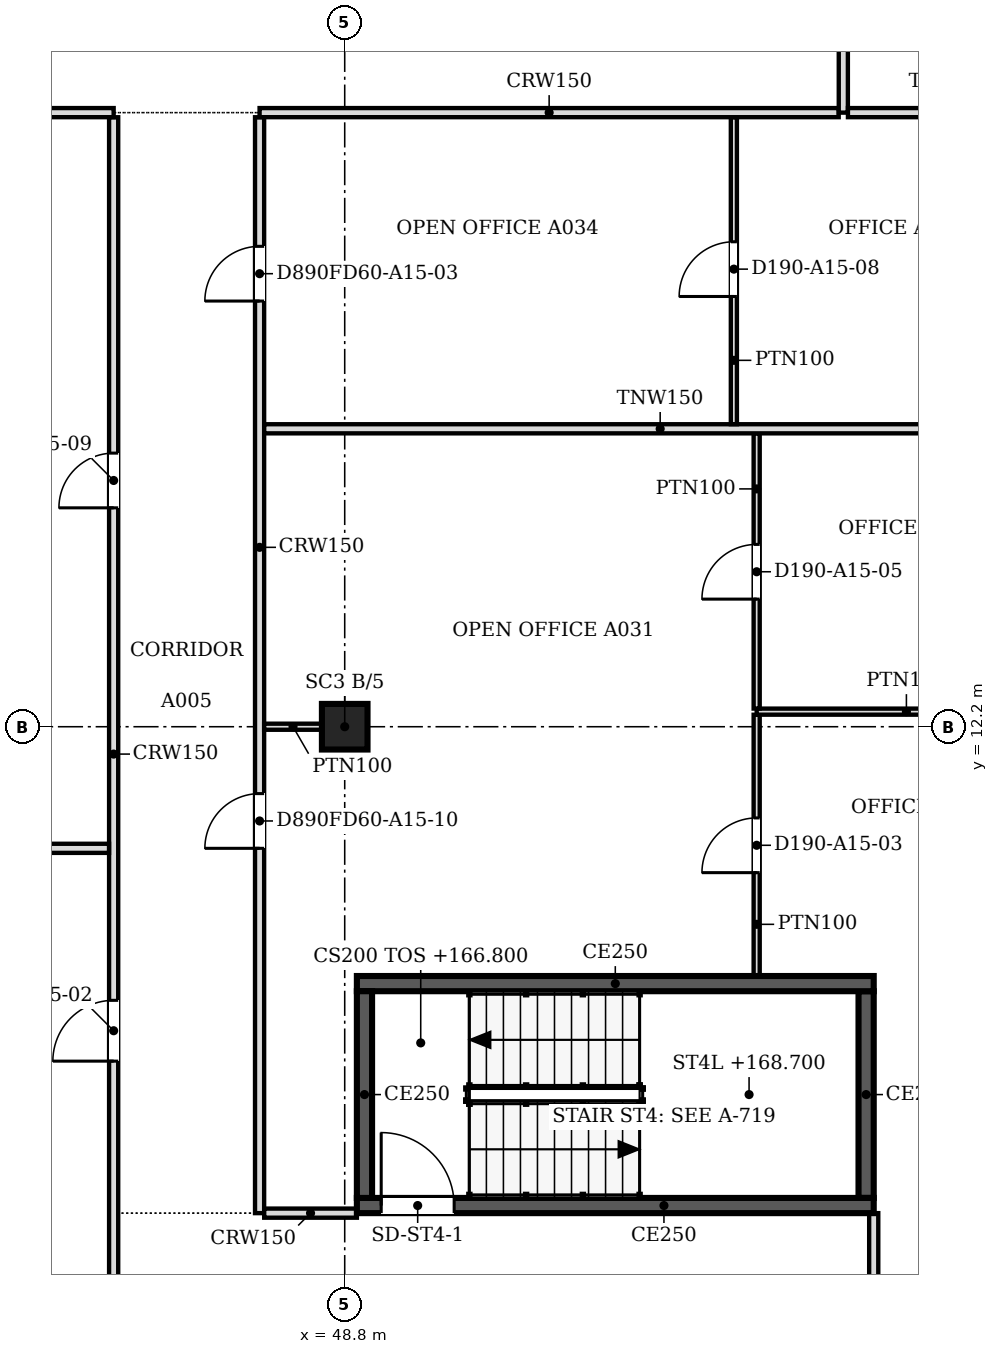
"""IFC4 building model, lengths in metres.
Left out: names, types, materials, properties, quantities, classifications, styles, units other than length and angle.
Written with IfcOpenShell. Run it as: python <this file> out.ifc"""

import sys

from ifc_helpers import new_model, si_unit, direction, frame, frame_2d, origin, origin_2d, place, context, subcontext, project, spatial, polyline, rectangle, outline, extrude, faceted_brep, source, transform, mapped, element, fill, save


model = new_model("IFC4")
c1 = context("Model", 3, precision=1e-05, world=origin(), true_north=direction((0.0, 1.0)))
c2 = subcontext(c1, "Body", "Model", "MODEL_VIEW")
j1 = project(units=[si_unit("LENGTHUNIT", "METRE"), si_unit("PLANEANGLEUNIT", "RADIAN")], contexts=[c1])
p1 = place(None, origin())
s1 = spatial("IfcSite", under=j1, at=p1, CompositionType="ELEMENT")
p2 = place(p1, origin())
s2 = spatial("IfcBuilding", under=s1, at=p2, CompositionType="ELEMENT")
p3 = place(p2, frame((0.0, 0.0, 166.8)))
s3 = spatial("IfcBuildingStorey", under=s2, at=p3, CompositionType="ELEMENT", Elevation=166.8)
p4 = place(p3, frame((48.8, 12.2, 0.0), z_axis=(0.0, 0.0, 1.0), x_axis=(1.0, 0.0, 0.0)))
e1 = element("IfcColumn", 1, at=p4, inside=s3, PredefinedType="COLUMN", context=c2, shape_type="SweptSolid", body=[
    extrude(rectangle(XDim=0.75, YDim=0.75, at=origin_2d()), origin(), (0.0, 0.0, 1.0), 3.6),
])
m1 = source(origin(), c2, "Body", "Brep", [
    faceted_brep([(0.053, -0.25, 0.0), (2.997, -0.25, 3.8), (0.053, -0.25, 7.6), (0.0, -0.25, 7.532), (0.0, -0.25, 0.068), (0.106, 0.25, 7.532), (2.944, 0.25, 3.868), (2.944, 0.25, 3.732), (0.106, 0.25, 0.068), (2.997, 0.0, 3.8), (0.053, 0.0, 0.0), (0.053, 0.0, 7.6)], [[[0, 1, 2, 3, 4]], [[5, 6, 7, 8]], [[8, 7, 9, 1, 0, 10]], [[6, 5, 11, 2, 1, 9]], [[3, 2, 11]], [[10, 0, 4]], [[8, 10, 4, 3, 11, 5]], [[9, 7, 6]]]),
])
p5 = place(p3, frame((57.569, 1.274, -3.8), z_axis=(0.0, 0.0, 1.0), x_axis=(0.707066050402, 0.707147509625, 0.0)))
e2 = element("IfcWall", 2, at=p5, inside=s3, PredefinedType="SOLIDWALL", context=c2, shape_type="MappedRepresentation", body=[
    mapped(m1, transform((0.0, 0.0, 0.0), scale=1.0)),
])
m2 = source(origin(), c2, "Body", "SweptSolid", [
    extrude(outline(polyline([(0.253, 0.666), (2.681, 3.8), (0.253, 6.934), (0.253, 0.666)])), frame((0.0, 0.26, 0.0), z_axis=(0.0, -1.0, 0.0), x_axis=(1.0, 0.0, 0.0)), (0.0, 0.0, 1.0), 0.52),
])
p6 = place(p5, origin())
e3 = element("IfcOpeningElement", 3, at=p6, cuts=e2, PredefinedType="OPENING", context=c2, shape_type="MappedRepresentation", body=[
    mapped(m2, transform((0.0, 0.0, 0.0), scale=1.0)),
])
p7 = place(p2, frame((0.0, 0.0, 170.6)))
s4 = spatial("IfcBuildingStorey", under=s2, at=p7, CompositionType="ELEMENT", Elevation=170.6)
m3 = source(origin(), c2, "Body", "Brep", [
    faceted_brep([(2.944, -0.25, 0.0), (2.997, -0.25, 0.068), (2.997, -0.25, 7.532), (2.944, -0.25, 7.6), (0.0, -0.25, 3.8), (0.053, 0.25, 3.868), (2.891, 0.25, 7.532), (2.891, 0.25, 0.068), (0.053, 0.25, 3.732), (2.944, 0.0, 0.0), (2.944, 0.0, 7.6), (0.0, 0.0, 3.8)], [[[0, 1, 2, 3, 4]], [[5, 6, 7, 8]], [[1, 0, 9]], [[10, 3, 2]], [[6, 5, 11, 4, 3, 10]], [[8, 7, 9, 0, 4, 11]], [[8, 11, 5]], [[1, 9, 7, 6, 10, 2]]]),
])
p8 = place(p7, frame((57.606, 1.312, -3.8), z_axis=(0.0, 0.0, 1.0), x_axis=(0.707147509625, 0.707066050402, 0.0)))
e4 = element("IfcWall", 4, at=p8, inside=s4, PredefinedType="SOLIDWALL", context=c2, shape_type="MappedRepresentation", body=[
    mapped(m3, transform((0.0, 0.0, 0.0), scale=1.0)),
])
m4 = source(origin(), c2, "Body", "SweptSolid", [
    extrude(outline(polyline([(2.744, 6.934), (0.316, 3.8), (2.744, 0.666), (2.744, 6.934)])), frame((0.0, 0.26, 0.0), z_axis=(0.0, -1.0, 0.0), x_axis=(1.0, 0.0, 0.0)), (0.0, 0.0, 1.0), 0.52),
])
p9 = place(p8, origin())
e5 = element("IfcOpeningElement", 5, at=p9, cuts=e4, PredefinedType="OPENING", context=c2, shape_type="MappedRepresentation", body=[
    mapped(m4, transform((0.0, 0.0, 0.0), scale=1.0)),
])
p10 = place(p3, frame((57.5, 4.325, 0.0), z_axis=(0.0, 0.0, 1.0), x_axis=(-1.0, 0.0, 0.0)))
e6 = element("IfcWall", 6, at=p10, inside=s3, PredefinedType="SOLIDWALL", context=c2, shape_type="SweptSolid", body=[
    extrude(rectangle(XDim=8.5, YDim=0.25, at=frame_2d((4.25, 0.0))), origin(), (0.0, 0.0, 1.0), 3.8),
])
m5 = source(origin(), c2, "Body", "SweptSolid", [
    extrude(rectangle(XDim=1.2, YDim=2.1, at=frame_2d((0.6, 1.05))), frame((0.0, 0.135, 0.0), z_axis=(0.0, -1.0, 0.0), x_axis=(1.0, 0.0, 0.0)), (0.0, 0.0, 1.0), 0.27),
])
p11 = place(p10, frame((6.9, 0.0, 0.0)))
e7 = element("IfcOpeningElement", 7, at=p11, cuts=e6, PredefinedType="OPENING", context=c2, shape_type="MappedRepresentation", body=[
    mapped(m5, transform((0.0, 0.0, 0.0), scale=1.0)),
])
p12 = place(p3, frame((49.125, 4.45, 0.0), z_axis=(0.0, 0.0, 1.0), x_axis=(0.0, 1.0, 0.0)))
e8 = element("IfcWall", 8, at=p12, inside=s3, PredefinedType="SOLIDWALL", context=c2, shape_type="SweptSolid", body=[
    extrude(rectangle(XDim=3.4, YDim=0.25, at=frame_2d((1.7, 0.0))), origin(), (0.0, 0.0, 1.0), 3.8),
])
p13 = place(p3, frame((49.0, 7.975, 0.0), z_axis=(0.0, 0.0, 1.0), x_axis=(1.0, 0.0, 0.0)))
e9 = element("IfcWall", 9, at=p13, inside=s3, PredefinedType="SOLIDWALL", context=c2, shape_type="SweptSolid", body=[
    extrude(rectangle(XDim=8.5, YDim=0.25, at=frame_2d((4.25, 0.0))), origin(), (0.0, 0.0, 1.0), 3.8),
])
p14 = place(p3, frame((57.375, 7.85, 0.0), z_axis=(0.0, 0.0, 1.0), x_axis=(0.0, -1.0, 0.0)))
e10 = element("IfcWall", 10, at=p14, inside=s3, PredefinedType="SOLIDWALL", context=c2, shape_type="SweptSolid", body=[
    extrude(rectangle(XDim=3.4, YDim=0.25, at=frame_2d((1.7, 0.0))), origin(), (0.0, 0.0, 1.0), 3.8),
])
p15 = place(p3, frame((45.0, 0.5, 0.0), z_axis=(0.0, 0.0, 1.0), x_axis=(0.0, 1.0, 0.0)))
e11 = element("IfcWall", 11, at=p15, inside=s3, PredefinedType="PARTITIONING", context=c2, shape_type="SweptSolid", body=[
    extrude(rectangle(XDim=21.724, YDim=0.15, at=frame_2d((10.862, 0.0))), origin(), (0.0, 0.0, 1.0), 3.067),
])
m6 = source(origin(), c2, "Body", "SweptSolid", [
    extrude(rectangle(XDim=1.0, YDim=2.1, at=frame_2d((0.5, 1.05))), frame((0.0, 0.085, 0.0), z_axis=(0.0, -1.0, 0.0), x_axis=(1.0, 0.0, 0.0)), (0.0, 0.0, 1.0), 0.17),
])
p16 = place(p15, frame((6.2, 0.0, 0.0)))
e12 = element("IfcOpeningElement", 12, at=p16, cuts=e11, PredefinedType="OPENING", context=c2, shape_type="MappedRepresentation", body=[
    mapped(m6, transform((0.0, 0.0, 0.0), scale=1.0)),
])
m7 = source(origin(), c2, "Body", "SweptSolid", [
    extrude(rectangle(XDim=0.9, YDim=2.1, at=frame_2d((0.45, 1.05))), frame((0.0, 0.085, 0.0), z_axis=(0.0, -1.0, 0.0), x_axis=(1.0, 0.0, 0.0)), (0.0, 0.0, 1.0), 0.17),
])
p17 = place(p15, frame((15.3, 0.0, 0.0)))
e13 = element("IfcOpeningElement", 13, at=p17, cuts=e11, PredefinedType="OPENING", context=c2, shape_type="MappedRepresentation", body=[
    mapped(m7, transform((0.0, 0.0, 0.0), scale=1.0)),
])
p18 = place(p3, frame((57.5, 1.559, 0.0), z_axis=(0.0, 0.0, 1.0), x_axis=(0.0, 1.0, 0.0)))
e14 = element("IfcWall", 14, at=p18, inside=s3, PredefinedType="PARTITIONING", context=c2, shape_type="SweptSolid", body=[
    extrude(rectangle(XDim=2.641, YDim=0.15, at=frame_2d((1.32, 0.0))), origin(), (0.0, 0.0, 1.0), 3.067),
])
p19 = place(p3, frame((47.4, 22.224, 0.0), z_axis=(0.0, 0.0, 1.0), x_axis=(0.0, -1.0, 0.0)))
e15 = element("IfcWall", 15, at=p19, inside=s3, PredefinedType="PARTITIONING", context=c2, shape_type="SweptSolid", body=[
    extrude(rectangle(XDim=18.024, YDim=0.15, at=frame_2d((9.012, 0.0))), origin(), (0.0, 0.0, 1.0), 3.067),
])
p20 = place(p19, frame((2.123, 0.0, 0.0)))
e16 = element("IfcOpeningElement", 16, at=p20, cuts=e15, PredefinedType="OPENING", context=c2, shape_type="MappedRepresentation", body=[
    mapped(m7, transform((0.0, 0.0, 0.0), scale=1.0)),
])
p21 = place(p19, frame((11.124, 0.0, 0.0)))
e17 = element("IfcOpeningElement", 17, at=p21, cuts=e15, PredefinedType="OPENING", context=c2, shape_type="MappedRepresentation", body=[
    mapped(m7, transform((0.0, 0.0, 0.0), scale=1.0)),
])
p22 = place(p3, frame((47.476, 4.2, 0.0), z_axis=(0.0, 0.0, 1.0), x_axis=(1.0, 0.0, 0.0)))
e18 = element("IfcWall", 18, at=p22, inside=s3, PredefinedType="PARTITIONING", context=c2, shape_type="SweptSolid", body=[
    extrude(rectangle(XDim=1.524, YDim=0.15, at=frame_2d((0.762, 0.0))), origin(), (0.0, 0.0, 1.0), 3.067),
])
p23 = place(p3, frame((55.575, 12.397, 0.0), z_axis=(0.0, 0.0, 1.0), x_axis=(0.0, -1.0, 0.0)))
e19 = element("IfcWall", 19, at=p23, inside=s3, PredefinedType="PARTITIONING", context=c2, shape_type="SweptSolid", body=[
    extrude(rectangle(XDim=4.297, YDim=0.1, at=frame_2d((2.148, 0.0))), origin(), (0.0, 0.0, 1.0), 3.067),
])
m8 = source(origin(), c2, "Body", "SweptSolid", [
    extrude(rectangle(XDim=0.9, YDim=2.1, at=frame_2d((0.45, 1.05))), frame((0.0, 0.06, 0.0), z_axis=(0.0, -1.0, 0.0), x_axis=(1.0, 0.0, 0.0)), (0.0, 0.0, 1.0), 0.12),
])
p24 = place(p23, frame((1.697, 0.0, 0.0)))
e20 = element("IfcOpeningElement", 20, at=p24, cuts=e19, PredefinedType="OPENING", context=c2, shape_type="MappedRepresentation", body=[
    mapped(m8, transform((0.0, 0.0, 0.0), scale=1.0)),
])
p25 = place(p3, frame((27.5, 10.2, 0.0), z_axis=(0.0, 0.0, 1.0), x_axis=(1.0, 0.0, 0.0)))
e21 = element("IfcWall", 21, at=p25, inside=s3, PredefinedType="PARTITIONING", context=c2, shape_type="SweptSolid", body=[
    extrude(rectangle(XDim=17.424, YDim=0.15, at=frame_2d((8.712, 0.0))), origin(), (0.0, 0.0, 1.0), 3.067),
])
p26 = place(p3, frame((48.425, 12.2, 0.0), z_axis=(0.0, 0.0, 1.0), x_axis=(-1.0, 0.0, 0.0)))
e22 = element("IfcWall", 22, at=p26, inside=s3, PredefinedType="PARTITIONING", context=c2, shape_type="SweptSolid", body=[
    extrude(rectangle(XDim=0.95, YDim=0.1, at=frame_2d((0.475, 0.0))), origin(), (0.0, 0.0, 1.0), 3.067),
])
p27 = place(p3, frame((55.575, 12.448, 0.0), z_axis=(0.0, 0.0, 1.0), x_axis=(1.0, 0.0, 0.0)))
e23 = element("IfcWall", 23, at=p27, inside=s3, PredefinedType="PARTITIONING", context=c2, shape_type="SweptSolid", body=[
    extrude(rectangle(XDim=4.925, YDim=0.1, at=frame_2d((2.462, 0.0))), origin(), (0.0, 0.0, 1.0), 3.067),
])
p28 = place(p3, frame((55.575, 17.024, 0.0), z_axis=(0.0, 0.0, 1.0), x_axis=(0.0, -1.0, 0.0)))
e24 = element("IfcWall", 24, at=p28, inside=s3, PredefinedType="PARTITIONING", context=c2, shape_type="SweptSolid", body=[
    extrude(rectangle(XDim=4.525, YDim=0.1, at=frame_2d((2.263, 0.0))), origin(), (0.0, 0.0, 1.0), 3.067),
])
p29 = place(p28, frame((1.825, 0.0, 0.0)))
e25 = element("IfcOpeningElement", 25, at=p29, cuts=e24, PredefinedType="OPENING", context=c2, shape_type="MappedRepresentation", body=[
    mapped(m8, transform((0.0, 0.0, 0.0), scale=1.0)),
])
p30 = place(p3, frame((47.476, 17.1, 0.0), z_axis=(0.0, 0.0, 1.0), x_axis=(1.0, 0.0, 0.0)))
e26 = element("IfcWall", 26, at=p30, inside=s3, PredefinedType="PARTITIONING", context=c2, shape_type="SweptSolid", body=[
    extrude(rectangle(XDim=13.024, YDim=0.15, at=frame_2d((6.512, 0.0))), origin(), (0.0, 0.0, 1.0), 3.067),
])
p31 = place(p3, frame((55.2, 22.224, 0.0), z_axis=(0.0, 0.0, 1.0), x_axis=(0.0, -1.0, 0.0)))
e27 = element("IfcWall", 27, at=p31, inside=s3, PredefinedType="PARTITIONING", context=c2, shape_type="SweptSolid", body=[
    extrude(rectangle(XDim=5.048, YDim=0.1, at=frame_2d((2.524, 0.0))), origin(), (0.0, 0.0, 1.0), 3.067),
])
p32 = place(p31, frame((2.048, 0.0, 0.0)))
e28 = element("IfcOpeningElement", 28, at=p32, cuts=e27, PredefinedType="OPENING", context=c2, shape_type="MappedRepresentation", body=[
    mapped(m8, transform((0.0, 0.0, 0.0), scale=1.0)),
])
p33 = place(p3, frame((30.5, 22.3, 0.0), z_axis=(0.0, 0.0, 1.0), x_axis=(1.0, 0.0, 0.0)))
e29 = element("IfcWall", 29, at=p33, inside=s3, PredefinedType="PARTITIONING", context=c2, shape_type="SweptSolid", body=[
    extrude(rectangle(XDim=14.5, YDim=0.15, at=frame_2d((7.25, 0.0))), origin(), (0.0, 0.0, 1.0), 3.067),
])
p34 = place(p3, frame((47.4, 22.3, 0.0), z_axis=(0.0, 0.0, 1.0), x_axis=(1.0, 0.0, 0.0)))
e30 = element("IfcWall", 30, at=p34, inside=s3, PredefinedType="PARTITIONING", context=c2, shape_type="SweptSolid", body=[
    extrude(rectangle(XDim=9.524, YDim=0.15, at=frame_2d((4.762, 0.0))), origin(), (0.0, 0.0, 1.0), 3.067),
])
p35 = place(p3, frame((57.0, 30.6, 0.0), z_axis=(0.0, 0.0, 1.0), x_axis=(0.0, -1.0, 0.0)))
e31 = element("IfcWall", 31, at=p35, inside=s3, PredefinedType="PARTITIONING", context=c2, shape_type="SweptSolid", body=[
    extrude(rectangle(XDim=8.3, YDim=0.15, at=frame_2d((4.15, 0.0))), origin(), (0.0, 0.0, 1.0), 3.067),
])
p36 = place(p35, frame((3.7, 0.0, 0.0)))
e32 = element("IfcOpeningElement", 32, at=p36, cuts=e31, PredefinedType="OPENING", context=c2, shape_type="MappedRepresentation", body=[
    mapped(m7, transform((0.0, 0.0, 0.0), scale=1.0)),
])
p37 = place(p3, frame((57.076, 22.3, 0.0), z_axis=(0.0, 0.0, 1.0), x_axis=(1.0, 0.0, 0.0)))
e33 = element("IfcWall", 33, at=p37, inside=s3, PredefinedType="PARTITIONING", context=c2, shape_type="SweptSolid", body=[
    extrude(rectangle(XDim=3.424, YDim=0.15, at=frame_2d((1.712, 0.0))), origin(), (0.0, 0.0, 1.0), 3.067),
])
m9 = source(origin(), c2, "Body", "SweptSolid", [
    extrude(rectangle(XDim=1.2, YDim=2.1, at=frame_2d((0.6, 1.05))), frame((0.0, 0.025, 0.0), z_axis=(0.0, -1.0, 0.0), x_axis=(1.0, 0.0, 0.0)), (0.0, 0.0, 1.0), 0.05),
])
p38 = place(p11, origin())
e34 = element("IfcDoor", 34, at=p38, inside=s3, OperationType="SINGLE_SWING_RIGHT", PredefinedType="DOOR", context=c2, shape_type="MappedRepresentation", body=[
    mapped(m9, transform((0.0, 0.0, 0.0), scale=1.0)),
])
fill(e7, e34)
m10 = source(origin(), c2, "Body", "SweptSolid", [
    extrude(rectangle(XDim=0.9, YDim=2.1, at=frame_2d((0.45, 1.05))), frame((0.0, 0.025, 0.0), z_axis=(0.0, -1.0, 0.0), x_axis=(1.0, 0.0, 0.0)), (0.0, 0.0, 1.0), 0.05),
])
p39 = place(p24, origin())
e35 = element("IfcDoor", 35, at=p39, inside=s3, OperationType="SINGLE_SWING_RIGHT", PredefinedType="DOOR", context=c2, shape_type="MappedRepresentation", body=[
    mapped(m10, transform((0.0, 0.0, 0.0), scale=1.0)),
])
fill(e20, e35)
p40 = place(p29, origin())
e36 = element("IfcDoor", 36, at=p40, inside=s3, OperationType="SINGLE_SWING_RIGHT", PredefinedType="DOOR", context=c2, shape_type="MappedRepresentation", body=[
    mapped(m10, transform((0.0, 0.0, 0.0), scale=1.0)),
])
fill(e25, e36)
p41 = place(p32, origin())
e37 = element("IfcDoor", 37, at=p41, inside=s3, OperationType="SINGLE_SWING_RIGHT", PredefinedType="DOOR", context=c2, shape_type="MappedRepresentation", body=[
    mapped(m10, transform((0.0, 0.0, 0.0), scale=1.0)),
])
fill(e28, e37)
p42 = place(p20, origin())
e38 = element("IfcDoor", 38, at=p42, inside=s3, OperationType="SINGLE_SWING_RIGHT", PredefinedType="DOOR", context=c2, shape_type="MappedRepresentation", body=[
    mapped(m10, transform((0.0, 0.0, 0.0), scale=1.0)),
])
fill(e16, e38)
m11 = source(origin(), c2, "Body", "SweptSolid", [
    extrude(rectangle(XDim=1.0, YDim=2.1, at=frame_2d((0.5, 1.05))), frame((0.0, 0.025, 0.0), z_axis=(0.0, -1.0, 0.0), x_axis=(1.0, 0.0, 0.0)), (0.0, 0.0, 1.0), 0.05),
])
p43 = place(p16, origin())
e39 = element("IfcDoor", 39, at=p43, inside=s3, OperationType="SINGLE_SWING_LEFT", PredefinedType="DOOR", context=c2, shape_type="MappedRepresentation", body=[
    mapped(m11, transform((0.0, 0.0, 0.0), scale=1.0)),
])
fill(e12, e39)
p44 = place(p17, origin())
e40 = element("IfcDoor", 40, at=p44, inside=s3, OperationType="SINGLE_SWING_LEFT", PredefinedType="DOOR", context=c2, shape_type="MappedRepresentation", body=[
    mapped(m10, transform((0.0, 0.0, 0.0), scale=1.0)),
])
fill(e13, e40)
p45 = place(p21, origin())
e41 = element("IfcDoor", 41, at=p45, inside=s3, OperationType="SINGLE_SWING_RIGHT", PredefinedType="DOOR", context=c2, shape_type="MappedRepresentation", body=[
    mapped(m10, transform((0.0, 0.0, 0.0), scale=1.0)),
])
fill(e17, e41)
save(model, sys.argv[1])
